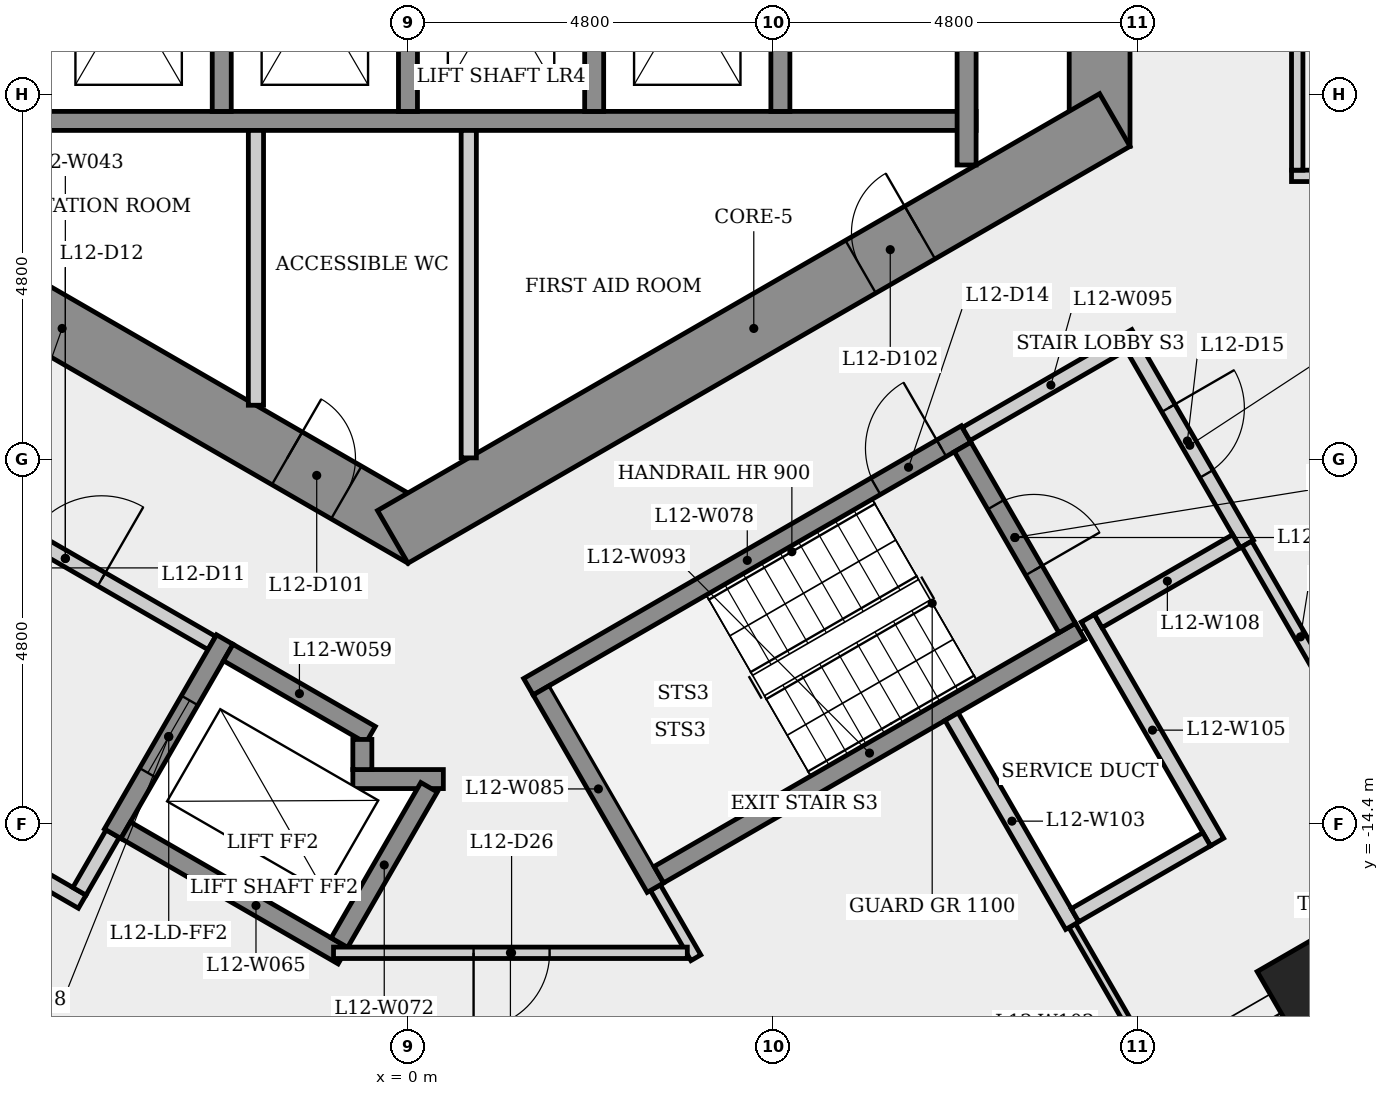
"""IFC4 building model, lengths in metres.
Left out: names, types, materials, properties, quantities, classifications, styles, units other than length and angle.
Written with IfcOpenShell. Run it as: python <this file> out.ifc"""

import sys

from ifc_helpers import new_model, si_unit, direction, frame, frame_2d, origin, origin_2d, place, context, subcontext, project, spatial, rectangle, extrude, element, fill, save


model = new_model("IFC4")
c1 = context("Model", 3, precision=1e-05, world=origin(), true_north=direction((0.0, 1.0)))
c2 = subcontext(c1, "Body", "Model", "MODEL_VIEW")
j1 = project(units=[si_unit("LENGTHUNIT", "METRE"), si_unit("PLANEANGLEUNIT", "RADIAN")], contexts=[c1])
p1 = place(None, origin())
s1 = spatial("IfcSite", under=j1, at=p1, CompositionType="ELEMENT")
p2 = place(p1, origin())
s2 = spatial("IfcBuilding", under=s1, at=p2, CompositionType="ELEMENT")
p3 = place(p2, frame((0.0, 0.0, 49.3)))
s3 = spatial("IfcBuildingStorey", under=s2, at=p3, CompositionType="ELEMENT", Elevation=49.3)
p4 = place(p3, frame((9.1, -5.485, 0.0), z_axis=(0.0, 0.0, 1.0), x_axis=(0.0, 1.0, 0.0)))
e1 = element("IfcWall", 1, at=p4, inside=s3, PredefinedType="SHEAR", context=c2, shape_type="SweptSolid", body=[
    extrude(rectangle(XDim=10.97, YDim=0.8, at=frame_2d((5.485, 0.0))), origin(), (0.0, 0.0, 1.0), 3.4),
])
p5 = place(p4, frame((4.685, 0.0, 0.0)))
e2 = element("IfcOpeningElement", 2, at=p5, cuts=e1, PredefinedType="OPENING", context=c2, shape_type="SweptSolid", body=[
    extrude(rectangle(XDim=1.6, YDim=2.1, at=frame_2d((0.8, 1.05))), frame((0.0, 0.41, 0.0), z_axis=(0.0, -1.0, 0.0), x_axis=(1.0, 0.0, 0.0)), (0.0, 0.0, 1.0), 0.82),
])
p6 = place(p3, frame((-9.3, -5.138, 0.0), z_axis=(0.0, 0.0, 1.0), x_axis=(0.866023993627, -0.500002442456, 0.0)))
e3 = element("IfcWall", 3, at=p6, inside=s3, PredefinedType="SHEAR", context=c2, shape_type="SweptSolid", body=[
    extrude(rectangle(XDim=10.97, YDim=0.8, at=frame_2d((5.485, 0.0))), origin(), (0.0, 0.0, 1.0), 3.4),
])
p7 = place(p6, frame((2.268, 0.0, 0.0)))
e4 = element("IfcOpeningElement", 4, at=p7, cuts=e3, PredefinedType="OPENING", context=c2, shape_type="SweptSolid", body=[
    extrude(rectangle(XDim=0.9, YDim=2.1, at=frame_2d((0.45, 1.05))), frame((0.0, 0.41, 0.0), z_axis=(0.0, -1.0, 0.0), x_axis=(1.0, 0.0, 0.0)), (0.0, 0.0, 1.0), 0.82),
])
p8 = place(p6, frame((8.903, 0.0, 0.0)))
e5 = element("IfcOpeningElement", 5, at=p8, cuts=e3, PredefinedType="OPENING", context=c2, shape_type="SweptSolid", body=[
    extrude(rectangle(XDim=0.9, YDim=2.1, at=frame_2d((0.45, 1.05))), frame((0.0, 0.41, 0.0), z_axis=(0.0, -1.0, 0.0), x_axis=(1.0, 0.0, 0.0)), (0.0, 0.0, 1.0), 0.82),
])
p9 = place(p3, frame((-0.2, -10.623, 0.0), z_axis=(0.0, 0.0, 1.0), x_axis=(0.866023993627, 0.500002442456, 0.0)))
e6 = element("IfcWall", 6, at=p9, inside=s3, PredefinedType="SHEAR", context=c2, shape_type="SweptSolid", body=[
    extrude(rectangle(XDim=10.97, YDim=0.8, at=frame_2d((5.485, 0.0))), origin(), (0.0, 0.0, 1.0), 3.4),
])
p10 = place(p9, frame((7.108, 0.0, 0.0)))
e7 = element("IfcOpeningElement", 7, at=p10, cuts=e6, PredefinedType="OPENING", context=c2, shape_type="SweptSolid", body=[
    extrude(rectangle(XDim=0.9, YDim=2.1, at=frame_2d((0.45, 1.05))), frame((0.0, 0.41, 0.0), z_axis=(0.0, -1.0, 0.0), x_axis=(1.0, 0.0, 0.0)), (0.0, 0.0, 1.0), 0.82),
])
p11 = place(p3, frame((11.993, -16.562, 0.0), z_axis=(0.0, 0.0, 1.0), x_axis=(0.5, -0.866025403784, 0.0)))
e8 = element("IfcColumn", 8, at=p11, inside=s3, PredefinedType="COLUMN", context=c2, shape_type="SweptSolid", body=[
    extrude(rectangle(XDim=1.2, YDim=1.2, at=origin_2d()), origin(), (0.0, 0.0, 1.0), 3.4),
])
p12 = place(p3, frame((-6.435, -9.795, 0.0), z_axis=(0.0, 0.0, 1.0), x_axis=(0.866012907634, -0.500021643343, 0.0)))
e9 = element("IfcWall", 9, at=p12, inside=s3, PredefinedType="PARTITIONING", context=c2, shape_type="SweptSolid", body=[
    extrude(rectangle(XDim=4.45, YDim=0.2, at=frame_2d((2.225, 0.0))), origin(), (0.0, 0.0, 1.0), 3.05),
])
p13 = place(p12, frame((1.675, 0.0, 0.0)))
e10 = element("IfcOpeningElement", 10, at=p13, cuts=e9, PredefinedType="OPENING", context=c2, shape_type="SweptSolid", body=[
    extrude(rectangle(XDim=1.1, YDim=2.1, at=frame_2d((0.55, 1.05))), frame((0.0, 0.11, 0.0), z_axis=(0.0, -1.0, 0.0), x_axis=(1.0, 0.0, 0.0)), (0.0, 0.0, 1.0), 0.22),
])
p14 = place(p3, frame((-7.225, -5.15, 0.0), z_axis=(0.0, 0.0, 1.0), x_axis=(1.0, 0.0, 0.0)))
e11 = element("IfcWall", 11, at=p14, inside=s3, PredefinedType="SHEAR", context=c2, shape_type="SweptSolid", body=[
    extrude(rectangle(XDim=14.7, YDim=0.25, at=frame_2d((7.35, 0.0))), origin(), (0.0, 0.0, 1.0), 3.05),
])
p15 = place(p3, frame((-4.286, -15.423, 0.0), z_axis=(0.0, 0.0, 1.0), x_axis=(-0.866025371046, 0.500000056704, 0.0)))
e12 = element("IfcWall", 12, at=p15, inside=s3, PredefinedType="PARTITIONING", context=c2, shape_type="SweptSolid", body=[
    extrude(rectangle(XDim=1.7, YDim=0.2, at=frame_2d((0.85, 0.0))), origin(), (0.0, 0.0, 1.0), 3.05),
])
p16 = place(p3, frame((-3.885, -14.529, 0.0), z_axis=(0.0, 0.0, 1.0), x_axis=(-0.499859285417, -0.866106630146, 0.0)))
e13 = element("IfcWall", 13, at=p16, inside=s3, PredefinedType="PARTITIONING", context=c2, shape_type="SweptSolid", body=[
    extrude(rectangle(XDim=0.875, YDim=0.2, at=frame_2d((0.438, 0.0))), origin(), (0.0, 0.0, 1.0), 3.05),
])
p17 = place(p3, frame((-2.41, -11.974, 0.0), z_axis=(0.0, 0.0, 1.0), x_axis=(-0.500001826776, -0.866024349092, 0.0)))
e14 = element("IfcWall", 14, at=p17, inside=s3, PredefinedType="SHEAR", context=c2, shape_type="SweptSolid", body=[
    extrude(rectangle(XDim=2.95, YDim=0.25, at=frame_2d((1.475, 0.0))), origin(), (0.0, 0.0, 1.0), 3.05),
])
p18 = place(p17, frame((0.925, 0.0, 0.0)))
e15 = element("IfcOpeningElement", 15, at=p18, cuts=e14, PredefinedType="OPENING", context=c2, shape_type="SweptSolid", body=[
    extrude(rectangle(XDim=1.1, YDim=2.1, at=frame_2d((0.55, 1.05))), frame((0.0, 0.135, 0.0), z_axis=(0.0, -1.0, 0.0), x_axis=(1.0, 0.0, 0.0)), (0.0, 0.0, 1.0), 0.27),
])
p19 = place(p3, frame((-2.364, -12.145, 0.0), z_axis=(0.0, 0.0, 1.0), x_axis=(0.86603892542, -0.499976579108, 0.0)))
e16 = element("IfcWall", 16, at=p19, inside=s3, PredefinedType="SHEAR", context=c2, shape_type="SweptSolid", body=[
    extrude(rectangle(XDim=2.162, YDim=0.25, at=frame_2d((1.081, 0.0))), origin(), (0.0, 0.0, 1.0), 3.05),
])
p20 = place(p3, frame((-2.45, -1.925, 0.0), z_axis=(0.0, 0.0, 1.0), x_axis=(0.0, -1.0, 0.0)))
e17 = element("IfcWall", 17, at=p20, inside=s3, PredefinedType="SHEAR", context=c2, shape_type="SweptSolid", body=[
    extrude(rectangle(XDim=3.1, YDim=0.25, at=frame_2d((1.55, 0.0))), origin(), (0.0, 0.0, 1.0), 3.4),
])
p21 = place(p3, frame((-2.0, -5.275, 0.0), z_axis=(0.0, 0.0, 1.0), x_axis=(0.0, -1.0, 0.0)))
e18 = element("IfcWall", 18, at=p21, inside=s3, PredefinedType="PARTITIONING", context=c2, shape_type="SweptSolid", body=[
    extrude(rectangle(XDim=3.616, YDim=0.2, at=frame_2d((1.808, 0.0))), origin(), (0.0, 0.0, 1.0), 3.05),
])
p22 = place(p3, frame((-0.856, -16.133, 0.0), z_axis=(0.0, 0.0, 1.0), x_axis=(-0.866021716278, 0.500006386895, 0.0)))
e19 = element("IfcWall", 19, at=p22, inside=s3, PredefinedType="SHEAR", context=c2, shape_type="SweptSolid", body=[
    extrude(rectangle(XDim=3.3, YDim=0.25, at=frame_2d((1.65, 0.0))), origin(), (0.0, 0.0, 1.0), 3.05),
])
p23 = place(p3, frame((-0.725, -13.81, 0.0), z_axis=(0.0, 0.0, 1.0), x_axis=(1.0, 0.0, 0.0)))
e20 = element("IfcWall", 20, at=p23, inside=s3, PredefinedType="SHEAR", context=c2, shape_type="SweptSolid", body=[
    extrude(rectangle(XDim=1.191, YDim=0.25, at=frame_2d((0.595, 0.0))), origin(), (0.0, 0.0, 1.0), 3.05),
])
p24 = place(p3, frame((-0.6, -13.289, 0.0), z_axis=(0.0, 0.0, 1.0), x_axis=(0.0, -1.0, 0.0)))
e21 = element("IfcWall", 21, at=p24, inside=s3, PredefinedType="SHEAR", context=c2, shape_type="SweptSolid", body=[
    extrude(rectangle(XDim=0.396, YDim=0.25, at=frame_2d((0.198, 0.0))), origin(), (0.0, 0.0, 1.0), 3.4),
])
p25 = place(p3, frame((0.0, -1.925, 0.0), z_axis=(0.0, 0.0, 1.0), x_axis=(0.0, -1.0, 0.0)))
e22 = element("IfcWall", 22, at=p25, inside=s3, PredefinedType="SHEAR", context=c2, shape_type="SweptSolid", body=[
    extrude(rectangle(XDim=3.1, YDim=0.25, at=frame_2d((1.55, 0.0))), origin(), (0.0, 0.0, 1.0), 3.4),
])
p26 = place(p3, frame((0.278, -13.918, 0.0), z_axis=(0.0, 0.0, 1.0), x_axis=(-0.49998806882, -0.866032292145, 0.0)))
e23 = element("IfcWall", 23, at=p26, inside=s3, PredefinedType="SHEAR", context=c2, shape_type="SweptSolid", body=[
    extrude(rectangle(XDim=2.36, YDim=0.25, at=frame_2d((1.18, 0.0))), origin(), (0.0, 0.0, 1.0), 3.4),
])
p27 = place(p3, frame((0.8, -5.275, 0.0), z_axis=(0.0, 0.0, 1.0), x_axis=(0.0, -1.0, 0.0)))
e24 = element("IfcWall", 24, at=p27, inside=s3, PredefinedType="PARTITIONING", context=c2, shape_type="SweptSolid", body=[
    extrude(rectangle(XDim=4.309, YDim=0.2, at=frame_2d((2.155, 0.0))), origin(), (0.0, 0.0, 1.0), 3.05),
])
p28 = place(p3, frame((1.585, -12.595, 0.0), z_axis=(0.0, 0.0, 1.0), x_axis=(0.866036417653, 0.499980922934, 0.0)))
e25 = element("IfcWall", 25, at=p28, inside=s3, PredefinedType="SHEAR", context=c2, shape_type="SweptSolid", body=[
    extrude(rectangle(XDim=6.65, YDim=0.25, at=frame_2d((3.325, 0.0))), origin(), (0.0, 0.0, 1.0), 3.05),
])
p29 = place(p28, frame((5.275, 0.0, 0.0)))
e26 = element("IfcOpeningElement", 26, at=p29, cuts=e25, PredefinedType="OPENING", context=c2, shape_type="SweptSolid", body=[
    extrude(rectangle(XDim=1.0, YDim=2.1, at=frame_2d((0.5, 1.05))), frame((0.0, 0.135, 0.0), z_axis=(0.0, -1.0, 0.0), x_axis=(1.0, 0.0, 0.0)), (0.0, 0.0, 1.0), 0.27),
])
p30 = place(p3, frame((2.45, -1.925, 0.0), z_axis=(0.0, 0.0, 1.0), x_axis=(0.0, -1.0, 0.0)))
e27 = element("IfcWall", 27, at=p30, inside=s3, PredefinedType="SHEAR", context=c2, shape_type="SweptSolid", body=[
    extrude(rectangle(XDim=3.1, YDim=0.25, at=frame_2d((1.55, 0.0))), origin(), (0.0, 0.0, 1.0), 3.4),
])
p31 = place(p3, frame((3.256, -15.239, 0.0), z_axis=(0.0, 0.0, 1.0), x_axis=(0.500059846627, -0.865990848561, 0.0)))
e28 = element("IfcWall", 28, at=p31, inside=s3, PredefinedType="PARTITIONING", context=c2, shape_type="SweptSolid", body=[
    extrude(rectangle(XDim=1.065, YDim=0.15, at=frame_2d((0.532, 0.0))), origin(), (0.0, 0.0, 1.0), 3.05),
])
p32 = place(p3, frame((3.256, -15.239, 0.0), z_axis=(0.0, 0.0, 1.0), x_axis=(-0.50002537861, 0.866010750942, 0.0)))
e29 = element("IfcWall", 29, at=p32, inside=s3, PredefinedType="SHEAR", context=c2, shape_type="SweptSolid", body=[
    extrude(rectangle(XDim=3.0, YDim=0.25, at=frame_2d((1.5, 0.0))), origin(), (0.0, 0.0, 1.0), 3.05),
])
p33 = place(p3, frame((3.676, -16.096, 0.0), z_axis=(0.0, 0.0, 1.0), x_axis=(-1.0, 0.0, 0.0)))
e30 = element("IfcWall", 30, at=p33, inside=s3, PredefinedType="PARTITIONING", context=c2, shape_type="SweptSolid", body=[
    extrude(rectangle(XDim=4.655, YDim=0.15, at=frame_2d((2.327, 0.0))), origin(), (0.0, 0.0, 1.0), 3.05),
])
p34 = place(p33, frame((1.812, 0.0, 0.0)))
e31 = element("IfcOpeningElement", 31, at=p34, cuts=e30, PredefinedType="OPENING", context=c2, shape_type="SweptSolid", body=[
    extrude(rectangle(XDim=1.0, YDim=2.1, at=frame_2d((0.5, 1.05))), frame((0.0, 0.085, 0.0), z_axis=(0.0, -1.0, 0.0), x_axis=(1.0, 0.0, 0.0)), (0.0, 0.0, 1.0), 0.17),
])
p35 = place(p3, frame((4.9, -1.925, 0.0), z_axis=(0.0, 0.0, 1.0), x_axis=(0.0, -1.0, 0.0)))
e32 = element("IfcWall", 32, at=p35, inside=s3, PredefinedType="SHEAR", context=c2, shape_type="SweptSolid", body=[
    extrude(rectangle(XDim=3.1, YDim=0.25, at=frame_2d((1.55, 0.0))), origin(), (0.0, 0.0, 1.0), 3.4),
])
p36 = place(p3, frame((3.301, -15.068, 0.0), z_axis=(0.0, 0.0, 1.0), x_axis=(0.866035036182, 0.499983315828, 0.0)))
e33 = element("IfcWall", 33, at=p36, inside=s3, PredefinedType="SHEAR", context=c2, shape_type="SweptSolid", body=[
    extrude(rectangle(XDim=6.4, YDim=0.25, at=frame_2d((3.2, 0.0))), origin(), (0.0, 0.0, 1.0), 3.05),
])
p37 = place(p3, frame((7.298, -9.441, 0.0), z_axis=(0.0, 0.0, 1.0), x_axis=(0.500034990121, -0.866005201286, 0.0)))
e34 = element("IfcWall", 34, at=p37, inside=s3, PredefinedType="SHEAR", context=c2, shape_type="SweptSolid", body=[
    extrude(rectangle(XDim=2.75, YDim=0.25, at=frame_2d((1.375, 0.0))), origin(), (0.0, 0.0, 1.0), 3.05),
])
p38 = place(p37, frame((0.875, 0.0, 0.0)))
e35 = element("IfcOpeningElement", 35, at=p38, cuts=e34, PredefinedType="OPENING", context=c2, shape_type="SweptSolid", body=[
    extrude(rectangle(XDim=1.0, YDim=2.1, at=frame_2d((0.5, 1.05))), frame((0.0, 0.135, 0.0), z_axis=(0.0, -1.0, 0.0), x_axis=(1.0, 0.0, 0.0)), (0.0, 0.0, 1.0), 0.27),
])
p39 = place(p3, frame((7.344, -9.27, 0.0), z_axis=(0.0, 0.0, 1.0), x_axis=(0.866005588531, 0.500034319456, 0.0)))
e36 = element("IfcWall", 36, at=p39, inside=s3, PredefinedType="PARTITIONING", context=c2, shape_type="SweptSolid", body=[
    extrude(rectangle(XDim=2.575, YDim=0.2, at=frame_2d((1.288, 0.0))), origin(), (0.0, 0.0, 1.0), 3.05),
])
p40 = place(p3, frame((7.35, -1.925, 0.0), z_axis=(0.0, 0.0, 1.0), x_axis=(0.0, -1.0, 0.0)))
e37 = element("IfcWall", 37, at=p40, inside=s3, PredefinedType="SHEAR", context=c2, shape_type="SweptSolid", body=[
    extrude(rectangle(XDim=3.805, YDim=0.25, at=frame_2d((1.903, 0.0))), origin(), (0.0, 0.0, 1.0), 3.05),
])
p41 = place(p3, frame((8.74, -15.738, 0.0), z_axis=(0.0, 0.0, 1.0), x_axis=(0.500052637874, -0.865995011161, 0.0)))
e38 = element("IfcWall", 38, at=p41, inside=s3, PredefinedType="PARTITIONING", context=c2, shape_type="SweptSolid", body=[
    extrude(rectangle(XDim=2.966, YDim=0.1, at=frame_2d((1.483, 0.0))), origin(), (0.0, 0.0, 1.0), 3.05),
])
p42 = place(p3, frame((8.74, -15.739, 0.0), z_axis=(0.0, 0.0, 1.0), x_axis=(-0.500017526161, 0.866015284814, 0.0)))
e39 = element("IfcWall", 39, at=p42, inside=s3, PredefinedType="PLUMBINGWALL", context=c2, shape_type="SweptSolid", body=[
    extrude(rectangle(XDim=3.175, YDim=0.2, at=frame_2d((1.588, 0.0))), origin(), (0.0, 0.0, 1.0), 3.05),
])
p43 = place(p3, frame((8.945, -11.694, 0.0), z_axis=(0.0, 0.0, 1.0), x_axis=(0.500062241894, -0.865989465428, 0.0)))
e40 = element("IfcWall", 40, at=p43, inside=s3, PredefinedType="PLUMBINGWALL", context=c2, shape_type="SweptSolid", body=[
    extrude(rectangle(XDim=3.4, YDim=0.2, at=frame_2d((1.7, 0.0))), origin(), (0.0, 0.0, 1.0), 3.05),
])
p44 = place(p3, frame((9.537, -8.119, 0.0), z_axis=(0.0, 0.0, 1.0), x_axis=(0.499990139034, -0.866031096941, 0.0)))
e41 = element("IfcWall", 41, at=p44, inside=s3, PredefinedType="PARTITIONING", context=c2, shape_type="SweptSolid", body=[
    extrude(rectangle(XDim=3.0, YDim=0.2, at=frame_2d((1.5, 0.0))), origin(), (0.0, 0.0, 1.0), 3.05),
])
p45 = place(p44, frame((0.935, 0.0, 0.0)))
e42 = element("IfcOpeningElement", 42, at=p45, cuts=e41, PredefinedType="OPENING", context=c2, shape_type="SweptSolid", body=[
    extrude(rectangle(XDim=1.0, YDim=2.1, at=frame_2d((0.5, 1.05))), frame((0.0, 0.11, 0.0), z_axis=(0.0, -1.0, 0.0), x_axis=(1.0, 0.0, 0.0)), (0.0, 0.0, 1.0), 0.22),
])
p46 = place(p3, frame((10.509, -14.602, 0.0), z_axis=(0.0, 0.0, 1.0), x_axis=(-0.866010750942, -0.50002537861, 0.0)))
e43 = element("IfcWall", 43, at=p46, inside=s3, PredefinedType="PLUMBINGWALL", context=c2, shape_type="SweptSolid", body=[
    extrude(rectangle(XDim=2.0, YDim=0.2, at=frame_2d((1.0, 0.0))), origin(), (0.0, 0.0, 1.0), 3.05),
])
p47 = place(p3, frame((10.901, -10.681, 0.0), z_axis=(0.0, 0.0, 1.0), x_axis=(-0.866009402589, -0.500027713859, 0.0)))
e44 = element("IfcWall", 44, at=p47, inside=s3, PredefinedType="PARTITIONING", context=c2, shape_type="SweptSolid", body=[
    extrude(rectangle(XDim=2.1, YDim=0.2, at=frame_2d((1.05, 0.0))), origin(), (0.0, 0.0, 1.0), 3.05),
])
p48 = place(p3, frame((11.625, -5.873, 0.0), z_axis=(0.0, 0.0, 1.0), x_axis=(1.0, 0.0, 0.0)))
e45 = element("IfcWall", 45, at=p48, inside=s3, PredefinedType="PARTITIONING", context=c2, shape_type="SweptSolid", body=[
    extrude(rectangle(XDim=5.031, YDim=0.15, at=frame_2d((2.516, 0.0))), origin(), (0.0, 0.0, 1.0), 3.05),
])
p49 = place(p3, frame((11.7, 5.873, 0.0), z_axis=(0.0, 0.0, 1.0), x_axis=(0.0, -1.0, 0.0)))
e46 = element("IfcWall", 46, at=p49, inside=s3, PredefinedType="PARTITIONING", context=c2, shape_type="SweptSolid", body=[
    extrude(rectangle(XDim=11.671, YDim=0.15, at=frame_2d((5.835, 0.0))), origin(), (0.0, 0.0, 1.0), 3.05),
])
p50 = place(p49, frame((5.336, 0.0, 0.0)))
e47 = element("IfcOpeningElement", 47, at=p50, cuts=e46, PredefinedType="OPENING", context=c2, shape_type="SweptSolid", body=[
    extrude(rectangle(XDim=1.0, YDim=2.1, at=frame_2d((0.5, 1.05))), frame((0.0, 0.085, 0.0), z_axis=(0.0, -1.0, 0.0), x_axis=(1.0, 0.0, 0.0)), (0.0, 0.0, 1.0), 0.17),
])
p51 = place(p3, frame((12.448, -13.161, 0.0), z_axis=(0.0, 0.0, 1.0), x_axis=(-0.499982078236, 0.866035750673, 0.0)))
e48 = element("IfcWall", 48, at=p51, inside=s3, PredefinedType="PARTITIONING", context=c2, shape_type="SweptSolid", body=[
    extrude(rectangle(XDim=2.822, YDim=0.15, at=frame_2d((1.411, 0.0))), origin(), (0.0, 0.0, 1.0), 3.05),
])
p52 = place(p13, origin())
e49 = element("IfcDoor", 49, at=p52, inside=s3, OperationType="SINGLE_SWING_RIGHT", PredefinedType="DOOR", context=c2, shape_type="SweptSolid", body=[
    extrude(rectangle(XDim=1.1, YDim=2.1, at=frame_2d((0.55, 1.05))), frame((0.0, 0.025, 0.0), z_axis=(0.0, -1.0, 0.0), x_axis=(1.0, 0.0, 0.0)), (0.0, 0.0, 1.0), 0.05),
])
fill(e10, e49)
p53 = place(p18, origin())
e50 = element("IfcDoor", 50, at=p53, inside=s3, OperationType="SLIDING_TO_LEFT", PredefinedType="DOOR", context=c2, shape_type="SweptSolid", body=[
    extrude(rectangle(XDim=1.1, YDim=2.1, at=frame_2d((0.55, 1.05))), frame((0.0, 0.025, 0.0), z_axis=(0.0, -1.0, 0.0), x_axis=(1.0, 0.0, 0.0)), (0.0, 0.0, 1.0), 0.05),
])
fill(e15, e50)
p54 = place(p29, origin())
e51 = element("IfcDoor", 51, at=p54, inside=s3, OperationType="SINGLE_SWING_RIGHT", PredefinedType="DOOR", context=c2, shape_type="SweptSolid", body=[
    extrude(rectangle(XDim=1.0, YDim=2.1, at=frame_2d((0.5, 1.05))), frame((0.0, 0.025, 0.0), z_axis=(0.0, -1.0, 0.0), x_axis=(1.0, 0.0, 0.0)), (0.0, 0.0, 1.0), 0.05),
])
fill(e26, e51)
p55 = place(p45, origin())
e52 = element("IfcDoor", 52, at=p55, inside=s3, OperationType="SINGLE_SWING_LEFT", PredefinedType="DOOR", context=c2, shape_type="SweptSolid", body=[
    extrude(rectangle(XDim=1.0, YDim=2.1, at=frame_2d((0.5, 1.05))), frame((0.0, 0.025, 0.0), z_axis=(0.0, -1.0, 0.0), x_axis=(1.0, 0.0, 0.0)), (0.0, 0.0, 1.0), 0.05),
])
fill(e42, e52)
p56 = place(p38, origin())
e53 = element("IfcDoor", 53, at=p56, inside=s3, OperationType="SINGLE_SWING_RIGHT", PredefinedType="DOOR", context=c2, shape_type="SweptSolid", body=[
    extrude(rectangle(XDim=1.0, YDim=2.1, at=frame_2d((0.5, 1.05))), frame((0.0, 0.025, 0.0), z_axis=(0.0, -1.0, 0.0), x_axis=(1.0, 0.0, 0.0)), (0.0, 0.0, 1.0), 0.05),
])
fill(e35, e53)
p57 = place(p34, origin())
e54 = element("IfcDoor", 54, at=p57, inside=s3, OperationType="SINGLE_SWING_RIGHT", PredefinedType="DOOR", context=c2, shape_type="SweptSolid", body=[
    extrude(rectangle(XDim=1.0, YDim=2.1, at=frame_2d((0.5, 1.05))), frame((0.0, 0.025, 0.0), z_axis=(0.0, -1.0, 0.0), x_axis=(1.0, 0.0, 0.0)), (0.0, 0.0, 1.0), 0.05),
])
fill(e31, e54)
p58 = place(p8, origin())
e55 = element("IfcDoor", 55, at=p58, inside=s3, OperationType="SINGLE_SWING_LEFT", PredefinedType="DOOR", context=c2, shape_type="SweptSolid", body=[
    extrude(rectangle(XDim=0.9, YDim=2.1, at=frame_2d((0.45, 1.05))), frame((0.0, 0.025, 0.0), z_axis=(0.0, -1.0, 0.0), x_axis=(1.0, 0.0, 0.0)), (0.0, 0.0, 1.0), 0.05),
])
fill(e5, e55)
p59 = place(p10, origin())
e56 = element("IfcDoor", 56, at=p59, inside=s3, OperationType="SINGLE_SWING_RIGHT", PredefinedType="DOOR", context=c2, shape_type="SweptSolid", body=[
    extrude(rectangle(XDim=0.9, YDim=2.1, at=frame_2d((0.45, 1.05))), frame((0.0, 0.025, 0.0), z_axis=(0.0, -1.0, 0.0), x_axis=(1.0, 0.0, 0.0)), (0.0, 0.0, 1.0), 0.05),
])
fill(e7, e56)
save(model, sys.argv[1])
